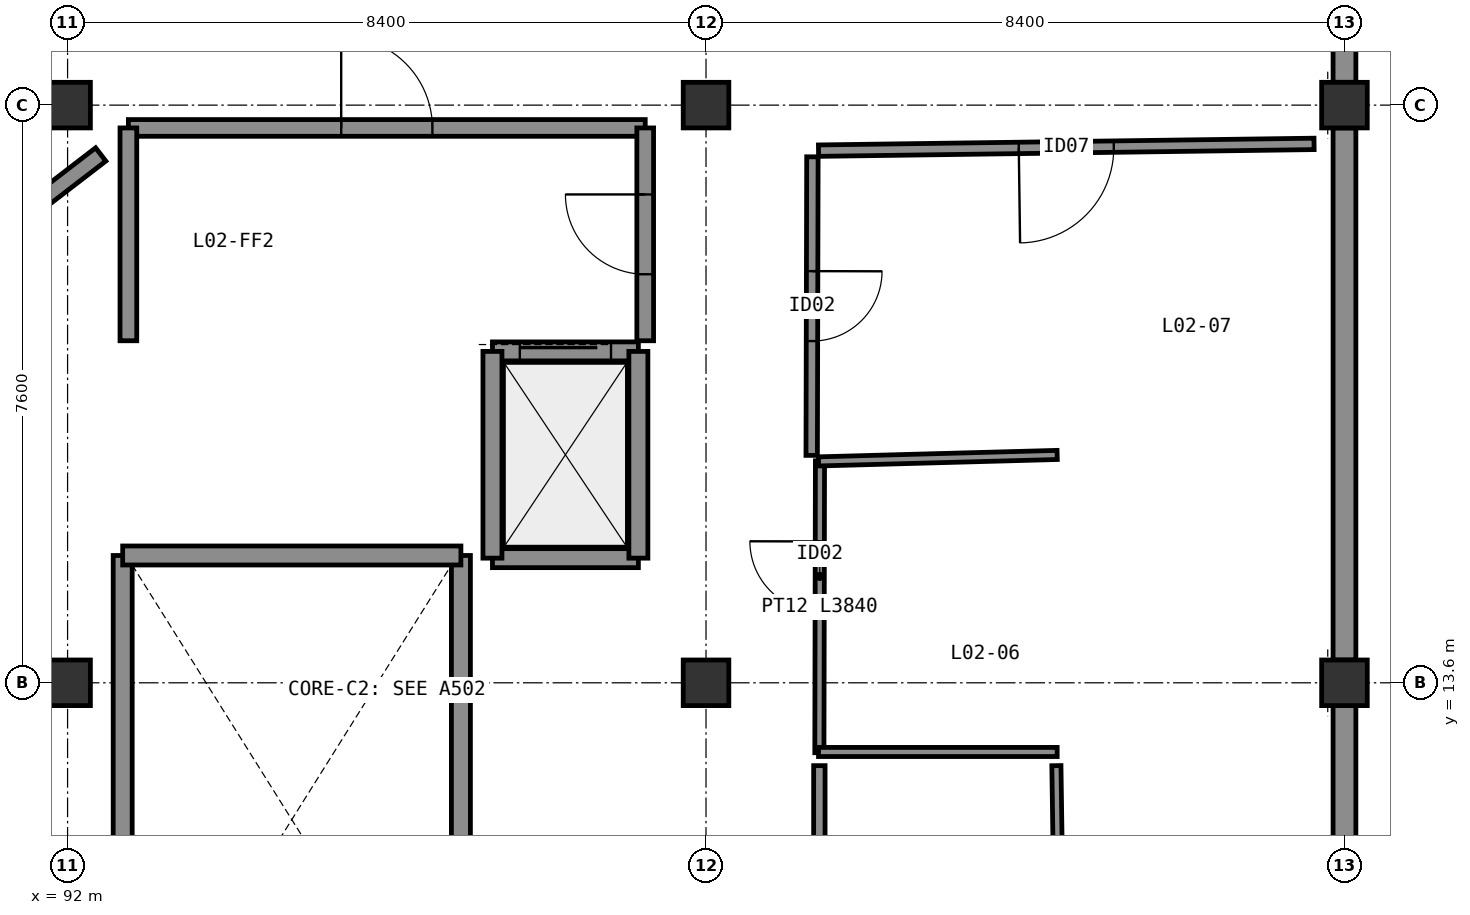
"""IFC4 building model, lengths in metres.
Left out: names, types, materials, properties, quantities, classifications, styles, units other than length and angle.
Written with IfcOpenShell. Run it as: python <this file> out.ifc"""

import sys

from ifc_helpers import new_model, si_unit, direction, frame, frame_2d, origin, origin_2d, place, context, subcontext, project, spatial, rectangle, extrude, element, fill, save


model = new_model("IFC4")
c1 = context("Model", 3, precision=1e-05, world=origin(), true_north=direction((0.0, 1.0)))
c2 = subcontext(c1, "Body", "Model", "MODEL_VIEW")
j1 = project(units=[si_unit("LENGTHUNIT", "METRE"), si_unit("PLANEANGLEUNIT", "RADIAN")], contexts=[c1])
p1 = place(None, origin())
s1 = spatial("IfcSite", under=j1, at=p1, CompositionType="ELEMENT")
p2 = place(p1, origin())
s2 = spatial("IfcBuilding", under=s1, at=p2, CompositionType="ELEMENT")
p3 = place(p2, frame((0.0, 0.0, 9.6)))
s3 = spatial("IfcBuildingStorey", under=s2, at=p3, CompositionType="ELEMENT", Elevation=9.6)
for number, where, z_axis, x_axis in (
    (1, (92.0, 13.6, 0.0), (0.0, 0.0, 1.0), (1.0, 0.0, 0.0)),
    (2, (100.4, 13.6, 0.0), (0.0, 0.0, 1.0), (1.0, 0.0, 0.0)),
    (3, (108.8, 13.6, 0.0), (0.0, 0.0, 1.0), (1.0, 0.0, 0.0)),
    (4, (92.0, 21.2, 0.0), (0.0, 0.0, 1.0), (1.0, 0.0, 0.0)),
    (5, (100.4, 21.2, 0.0), (0.0, 0.0, 1.0), (1.0, 0.0, 0.0)),
    (6, (108.8, 21.2, 0.0), (0.0, 0.0, 1.0), (1.0, 0.0, 0.0)),
):
    element("IfcColumn", number, at=place(p3, frame(where, z_axis=z_axis, x_axis=x_axis)), inside=s3, PredefinedType="COLUMN", context=c2, shape_type="SweptSolid", body=[
        extrude(rectangle(XDim=0.6, YDim=0.6, at=origin_2d()), origin(), (0.0, 0.0, 1.0), 4.2),
    ])
for number, where, z_axis, x_axis in (
    (7, (108.8, 6.3, 0.0), (0.0, 0.0, 1.0), (0.0, 1.0, 0.0)),
    (8, (108.8, 13.9, 0.0), (0.0, 0.0, 1.0), (0.0, 1.0, 0.0)),
    (9, (108.8, 21.5, 0.0), (0.0, 0.0, 1.0), (0.0, 1.0, 0.0)),
):
    element("IfcWall", number, at=place(p3, frame(where, z_axis=z_axis, x_axis=x_axis)), inside=s3, PredefinedType="SOLIDWALL", context=c2, shape_type="SweptSolid", body=[
        extrude(rectangle(XDim=7.0, YDim=0.3, at=frame_2d((3.5, 0.0))), origin(), (0.0, 0.0, 1.0), 3.135),
    ])
p4 = place(p3, frame((92.725, 6.225, 0.0), z_axis=(0.0, 0.0, 1.0), x_axis=(0.0, 1.0, 0.0)))
e10 = element("IfcWall", 10, at=p4, inside=s3, PredefinedType="SHEAR", context=c2, shape_type="SweptSolid", body=[
    extrude(rectangle(XDim=9.05, YDim=0.25, at=frame_2d((4.525, 0.0))), origin(), (0.0, 0.0, 1.0), 3.95),
])
p5 = place(p3, frame((97.175, 6.225, 0.0), z_axis=(0.0, 0.0, 1.0), x_axis=(0.0, 1.0, 0.0)))
e11 = element("IfcWall", 11, at=p5, inside=s3, PredefinedType="SHEAR", context=c2, shape_type="SweptSolid", body=[
    extrude(rectangle(XDim=9.05, YDim=0.25, at=frame_2d((4.525, 0.0))), origin(), (0.0, 0.0, 1.0), 3.95),
])
p6 = place(p5, frame((0.55, 0.0, 0.0)))
e12 = element("IfcOpeningElement", 12, at=p6, cuts=e11, PredefinedType="OPENING", context=c2, shape_type="SweptSolid", body=[
    extrude(rectangle(XDim=1.05, YDim=2.1, at=frame_2d((0.525, 1.05))), frame((0.0, 0.135, 0.0), z_axis=(0.0, -1.0, 0.0), x_axis=(1.0, 0.0, 0.0)), (0.0, 0.0, 1.0), 0.27),
])
p7 = place(p3, frame((92.725, 15.275, 0.0), z_axis=(0.0, 0.0, 1.0), x_axis=(1.0, 0.0, 0.0)))
e13 = element("IfcWall", 13, at=p7, inside=s3, PredefinedType="SHEAR", context=c2, shape_type="SweptSolid", body=[
    extrude(rectangle(XDim=4.45, YDim=0.25, at=frame_2d((2.225, 0.0))), origin(), (0.0, 0.0, 1.0), 3.95),
])
p8 = place(p3, frame((92.8, 20.9, 0.0), z_axis=(0.0, 0.0, 1.0), x_axis=(1.0, 0.0, 0.0)))
e14 = element("IfcWall", 14, at=p8, inside=s3, PredefinedType="SOLIDWALL", context=c2, shape_type="SweptSolid", body=[
    extrude(rectangle(XDim=6.8, YDim=0.22, at=frame_2d((3.4, 0.0))), origin(), (0.0, 0.0, 1.0), 3.93),
])
p9 = place(p8, frame((2.8, 0.0, 0.0)))
e15 = element("IfcOpeningElement", 15, at=p9, cuts=e14, PredefinedType="OPENING", context=c2, shape_type="SweptSolid", body=[
    extrude(rectangle(XDim=1.2, YDim=2.1, at=frame_2d((0.6, 1.05))), frame((0.0, 0.12, 0.0), z_axis=(0.0, -1.0, 0.0), x_axis=(1.0, 0.0, 0.0)), (0.0, 0.0, 1.0), 0.24),
])
p10 = place(p3, frame((92.8, 18.1, 0.0), z_axis=(0.0, 0.0, 1.0), x_axis=(0.0, 1.0, 0.0)))
e16 = element("IfcWall", 16, at=p10, inside=s3, PredefinedType="SOLIDWALL", context=c2, shape_type="SweptSolid", body=[
    extrude(rectangle(XDim=2.8, YDim=0.22, at=frame_2d((1.4, 0.0))), origin(), (0.0, 0.0, 1.0), 3.93),
])
p11 = place(p3, frame((99.6, 18.1, 0.0), z_axis=(0.0, 0.0, 1.0), x_axis=(0.0, 1.0, 0.0)))
e17 = element("IfcWall", 17, at=p11, inside=s3, PredefinedType="SOLIDWALL", context=c2, shape_type="SweptSolid", body=[
    extrude(rectangle(XDim=2.8, YDim=0.22, at=frame_2d((1.4, 0.0))), origin(), (0.0, 0.0, 1.0), 3.93),
])
p12 = place(p11, frame((0.875, 0.0, 0.0)))
e18 = element("IfcOpeningElement", 18, at=p12, cuts=e17, PredefinedType="OPENING", context=c2, shape_type="SweptSolid", body=[
    extrude(rectangle(XDim=1.05, YDim=2.1, at=frame_2d((0.525, 1.05))), frame((0.0, 0.12, 0.0), z_axis=(0.0, -1.0, 0.0), x_axis=(1.0, 0.0, 0.0)), (0.0, 0.0, 1.0), 0.24),
])
p13 = place(p3, frame((97.59, 15.24, 0.0), z_axis=(0.0, 0.0, 1.0), x_axis=(1.0, 0.0, 0.0)))
e19 = element("IfcWall", 19, at=p13, inside=s3, PredefinedType="SHEAR", context=c2, shape_type="SweptSolid", body=[
    extrude(rectangle(XDim=1.92, YDim=0.25, at=frame_2d((0.96, 0.0))), origin(), (0.0, 0.0, 1.0), 3.95),
])
p14 = place(p3, frame((97.59, 17.96, 0.0), z_axis=(0.0, 0.0, 1.0), x_axis=(1.0, 0.0, 0.0)))
e20 = element("IfcWall", 20, at=p14, inside=s3, PredefinedType="SHEAR", context=c2, shape_type="SweptSolid", body=[
    extrude(rectangle(XDim=1.92, YDim=0.25, at=frame_2d((0.96, 0.0))), origin(), (0.0, 0.0, 1.0), 3.95),
])
p15 = place(p14, frame((0.36, 0.0, 0.0)))
e21 = element("IfcOpeningElement", 21, at=p15, cuts=e20, PredefinedType="OPENING", context=c2, shape_type="SweptSolid", body=[
    extrude(rectangle(XDim=1.2, YDim=2.2, at=frame_2d((0.6, 1.1))), frame((0.0, 0.135, 0.0), z_axis=(0.0, -1.0, 0.0), x_axis=(1.0, 0.0, 0.0)), (0.0, 0.0, 1.0), 0.27),
])
for number, where, z_axis, x_axis in (
    (22, (97.59, 15.24, 0.0), (0.0, 0.0, 1.0), (0.0, 1.0, 0.0)),
    (23, (99.51, 15.24, 0.0), (0.0, 0.0, 1.0), (0.0, 1.0, 0.0)),
):
    element("IfcWall", number, at=place(p3, frame(where, z_axis=z_axis, x_axis=x_axis)), inside=s3, PredefinedType="SHEAR", context=c2, shape_type="SweptSolid", body=[
        extrude(rectangle(XDim=2.72, YDim=0.25, at=frame_2d((1.36, 0.0))), origin(), (0.0, 0.0, 1.0), 3.95),
    ])
p16 = place(p3, frame((101.891, 12.68, 0.0), z_axis=(0.0, 0.0, 1.0), x_axis=(0.002098030858, 0.999997799131, 0.0)))
e24 = element("IfcWall", 24, at=p16, inside=s3, PredefinedType="PARTITIONING", context=c2, shape_type="SweptSolid", body=[
    extrude(rectangle(XDim=3.84, YDim=0.12, at=frame_2d((1.92, 0.0))), origin(), (0.0, 0.0, 1.0), 3.93),
])
p17 = place(p16, frame((1.86, 0.0, 0.0)))
e25 = element("IfcOpeningElement", 25, at=p17, cuts=e24, PredefinedType="OPENING", context=c2, shape_type="SweptSolid", body=[
    extrude(rectangle(XDim=0.92, YDim=2.08, at=frame_2d((0.46, 1.04))), frame((0.0, 0.07, 0.0), z_axis=(0.0, -1.0, 0.0), x_axis=(1.0, 0.0, 0.0)), (0.0, 0.0, 1.0), 0.14),
])
p18 = place(p3, frame((101.89, 6.4, 0.0), z_axis=(0.0, 0.0, 1.0), x_axis=(0.000239741073, 0.999999971262, 0.0)))
e26 = element("IfcWall", 26, at=p18, inside=s3, PredefinedType="PARTITIONING", context=c2, shape_type="SweptSolid", body=[
    extrude(rectangle(XDim=6.11, YDim=0.15, at=frame_2d((3.055, 0.0))), origin(), (0.0, 0.0, 1.0), 3.93),
])
p19 = place(p18, frame((2.48, 0.0, 0.0)))
e27 = element("IfcOpeningElement", 27, at=p19, cuts=e26, PredefinedType="OPENING", context=c2, shape_type="SweptSolid", body=[
    extrude(rectangle(XDim=1.15, YDim=2.12, at=frame_2d((0.575, 1.06))), frame((0.0, 0.085, 0.0), z_axis=(0.0, -1.0, 0.0), x_axis=(1.0, 0.0, 0.0)), (0.0, 0.0, 1.0), 0.17),
])
p20 = place(p3, frame((108.4, 20.69, 0.0), z_axis=(0.0, 0.0, 1.0), x_axis=(-0.999907125909, -0.013628630039, 0.0)))
e28 = element("IfcWall", 28, at=p20, inside=s3, PredefinedType="PARTITIONING", context=c2, shape_type="SweptSolid", body=[
    extrude(rectangle(XDim=6.521, YDim=0.15, at=frame_2d((3.26, 0.0))), origin(), (0.0, 0.0, 1.0), 3.93),
])
p21 = place(p20, frame((2.635, 0.0, 0.0)))
e29 = element("IfcOpeningElement", 29, at=p21, cuts=e28, PredefinedType="OPENING", context=c2, shape_type="SweptSolid", body=[
    extrude(rectangle(XDim=1.25, YDim=2.12, at=frame_2d((0.625, 1.06))), frame((0.0, 0.085, 0.0), z_axis=(0.0, -1.0, 0.0), x_axis=(1.0, 0.0, 0.0)), (0.0, 0.0, 1.0), 0.17),
])
p22 = place(p3, frame((101.8, 20.52, 0.0), z_axis=(0.0, 0.0, 1.0), x_axis=(-0.002424009287, -0.999997062085, 0.0)))
e30 = element("IfcWall", 30, at=p22, inside=s3, PredefinedType="PARTITIONING", context=c2, shape_type="SweptSolid", body=[
    extrude(rectangle(XDim=3.928, YDim=0.15, at=frame_2d((1.964, 0.0))), origin(), (0.0, 0.0, 1.0), 3.93),
])
p23 = place(p22, frame((1.504, 0.0, 0.0)))
e31 = element("IfcOpeningElement", 31, at=p23, cuts=e30, PredefinedType="OPENING", context=c2, shape_type="SweptSolid", body=[
    extrude(rectangle(XDim=0.92, YDim=2.08, at=frame_2d((0.46, 1.04))), frame((0.0, 0.085, 0.0), z_axis=(0.0, -1.0, 0.0), x_axis=(1.0, 0.0, 0.0)), (0.0, 0.0, 1.0), 0.17),
])
p24 = place(p3, frame((92.436, 20.551, 0.0), z_axis=(0.0, 0.0, 1.0), x_axis=(-0.792804184344, -0.609476435382, 0.0)))
e32 = element("IfcWall", 32, at=p24, inside=s3, PredefinedType="SOLIDWALL", context=c2, shape_type="SweptSolid", body=[
    extrude(rectangle(XDim=18.38, YDim=0.22, at=frame_2d((9.19, 0.0))), origin(), (0.0, 0.0, 1.0), 3.93),
])
p25 = place(p24, frame((8.19, 0.0, 0.0)))
e33 = element("IfcOpeningElement", 33, at=p25, cuts=e32, PredefinedType="OPENING", context=c2, shape_type="SweptSolid", body=[
    extrude(rectangle(XDim=2.0, YDim=2.25, at=frame_2d((1.0, 1.125))), frame((0.0, 0.12, 0.0), z_axis=(0.0, -1.0, 0.0), x_axis=(1.0, 0.0, 0.0)), (0.0, 0.0, 1.0), 0.24),
])
p26 = place(p3, frame((105.02, 12.69, 0.0), z_axis=(0.0, 0.0, 1.0), x_axis=(-1.0, 0.0, 0.0)))
e34 = element("IfcWall", 34, at=p26, inside=s3, PredefinedType="PARTITIONING", context=c2, shape_type="SweptSolid", body=[
    extrude(rectangle(XDim=3.14, YDim=0.12, at=frame_2d((1.57, 0.0))), origin(), (0.0, 0.0, 1.0), 3.93),
])
p27 = place(p3, frame((101.88, 16.513, 0.0), z_axis=(0.0, 0.0, 1.0), x_axis=(0.999632070922, 0.02712421029, 0.0)))
e35 = element("IfcWall", 35, at=p27, inside=s3, PredefinedType="PARTITIONING", context=c2, shape_type="SweptSolid", body=[
    extrude(rectangle(XDim=3.141, YDim=0.12, at=frame_2d((1.571, 0.0))), origin(), (0.0, 0.0, 1.0), 3.93),
])
p28 = place(p3, frame((105.01, 12.51, 0.0), z_axis=(0.0, 0.0, 1.0), x_axis=(0.014742474068, -0.999891323824, 0.0)))
e36 = element("IfcWall", 36, at=p28, inside=s3, PredefinedType="PARTITIONING", context=c2, shape_type="SweptSolid", body=[
    extrude(rectangle(XDim=6.111, YDim=0.12, at=frame_2d((3.055, 0.0))), origin(), (0.0, 0.0, 1.0), 3.93),
])
p29 = place(p28, frame((2.515, 0.0, 0.0)))
e37 = element("IfcOpeningElement", 37, at=p29, cuts=e36, PredefinedType="OPENING", context=c2, shape_type="SweptSolid", body=[
    extrude(rectangle(XDim=1.08, YDim=2.12, at=frame_2d((0.54, 1.06))), frame((0.0, 0.07, 0.0), z_axis=(0.0, -1.0, 0.0), x_axis=(1.0, 0.0, 0.0)), (0.0, 0.0, 1.0), 0.14),
])
p30 = place(p9, origin())
e38 = element("IfcDoor", 38, at=p30, inside=s3, OperationType="SINGLE_SWING_LEFT", PredefinedType="DOOR", context=c2, shape_type="SweptSolid", body=[
    extrude(rectangle(XDim=1.2, YDim=2.1, at=frame_2d((0.6, 1.05))), frame((0.0, 0.025, 0.0), z_axis=(0.0, -1.0, 0.0), x_axis=(1.0, 0.0, 0.0)), (0.0, 0.0, 1.0), 0.05),
])
fill(e15, e38)
p31 = place(p12, origin())
e39 = element("IfcDoor", 39, at=p31, inside=s3, OperationType="SINGLE_SWING_RIGHT", PredefinedType="DOOR", context=c2, shape_type="SweptSolid", body=[
    extrude(rectangle(XDim=1.05, YDim=2.1, at=frame_2d((0.525, 1.05))), frame((0.0, 0.025, 0.0), z_axis=(0.0, -1.0, 0.0), x_axis=(1.0, 0.0, 0.0)), (0.0, 0.0, 1.0), 0.05),
])
fill(e18, e39)
p32 = place(p15, origin())
e40 = element("IfcDoor", 40, at=p32, inside=s3, OperationType="SLIDING_TO_LEFT", PredefinedType="DOOR", context=c2, shape_type="SweptSolid", body=[
    extrude(rectangle(XDim=1.2, YDim=2.2, at=frame_2d((0.6, 1.1))), frame((0.0, 0.025, 0.0), z_axis=(0.0, -1.0, 0.0), x_axis=(1.0, 0.0, 0.0)), (0.0, 0.0, 1.0), 0.05),
])
fill(e21, e40)
p33 = place(p17, origin())
e41 = element("IfcDoor", 41, at=p33, inside=s3, OperationType="SINGLE_SWING_RIGHT", PredefinedType="DOOR", context=c2, shape_type="SweptSolid", body=[
    extrude(rectangle(XDim=0.92, YDim=2.08, at=frame_2d((0.46, 1.04))), frame((0.0, 0.025, 0.0), z_axis=(0.0, -1.0, 0.0), x_axis=(1.0, 0.0, 0.0)), (0.0, 0.0, 1.0), 0.05),
])
fill(e25, e41)
p34 = place(p21, origin())
e42 = element("IfcDoor", 42, at=p34, inside=s3, OperationType="SINGLE_SWING_RIGHT", PredefinedType="DOOR", context=c2, shape_type="SweptSolid", body=[
    extrude(rectangle(XDim=1.25, YDim=2.12, at=frame_2d((0.625, 1.06))), frame((0.0, 0.025, 0.0), z_axis=(0.0, -1.0, 0.0), x_axis=(1.0, 0.0, 0.0)), (0.0, 0.0, 1.0), 0.05),
])
fill(e29, e42)
p35 = place(p23, origin())
e43 = element("IfcDoor", 43, at=p35, inside=s3, OperationType="SINGLE_SWING_LEFT", PredefinedType="DOOR", context=c2, shape_type="SweptSolid", body=[
    extrude(rectangle(XDim=0.92, YDim=2.08, at=frame_2d((0.46, 1.04))), frame((0.0, 0.025, 0.0), z_axis=(0.0, -1.0, 0.0), x_axis=(1.0, 0.0, 0.0)), (0.0, 0.0, 1.0), 0.05),
])
fill(e31, e43)
save(model, sys.argv[1])
